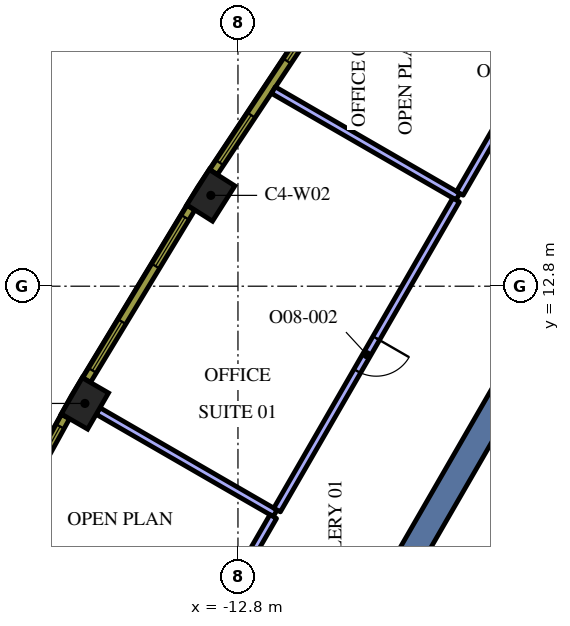
"""IFC4 building model, lengths in metres.
Left out: names, types, materials, properties, quantities, classifications, styles, units other than length and angle.
Written with IfcOpenShell. Run it as: python <this file> out.ifc"""

import sys

from ifc_helpers import new_model, si_unit, direction, frame, frame_2d, origin, origin_2d, place, context, subcontext, project, spatial, rectangle, extrude, element, fill, save


model = new_model("IFC4")
c1 = context("Model", 3, precision=1e-05, world=origin(), true_north=direction((0.0, 1.0)))
c2 = subcontext(c1, "Body", "Model", "MODEL_VIEW")
j1 = project(units=[si_unit("LENGTHUNIT", "METRE"), si_unit("PLANEANGLEUNIT", "RADIAN")], contexts=[c1])
p1 = place(None, origin())
s1 = spatial("IfcSite", under=j1, at=p1, CompositionType="ELEMENT")
p2 = place(p1, origin())
s2 = spatial("IfcBuilding", under=s1, at=p2, CompositionType="ELEMENT")
p3 = place(p2, frame((0.0, 0.0, 235.2)))
s3 = spatial("IfcBuildingStorey", under=s2, at=p3, CompositionType="ELEMENT", Elevation=235.2)
for number, where, z_axis, x_axis in (
    (1, (-13.513, 15.19, 0.0), (0.0, 0.0, 1.0), (-0.536, -0.845, 0.0)),
    (2, (-16.827, 9.715, 0.0), (0.0, 0.0, 1.0), (-0.5, -0.866, 0.0)),
):
    element("IfcColumn", number, at=place(p3, frame(where, z_axis=z_axis, x_axis=x_axis)), inside=s3, PredefinedType="COLUMN", context=c2, shape_type="SweptSolid", body=[
        extrude(rectangle(XDim=1.1, YDim=0.8, at=origin_2d()), origin(), (0.0, 0.0, 1.0), 4.2),
    ])
p4 = place(p3, frame((-12.625, -1.867, 0.0), z_axis=(0.0, 0.0, 1.0), x_axis=(0.500008520515, 0.866020484407, 0.0)))
e3 = element("IfcWall", 3, at=p4, inside=s3, PredefinedType="SOLIDWALL", context=c2, shape_type="SweptSolid", body=[
    extrude(rectangle(XDim=15.859, YDim=0.7, at=frame_2d((7.929, 0.0))), origin(), (0.0, 0.0, 1.0), 4.2),
])
p5 = place(p3, frame((-8.06, -1.311, 0.0), z_axis=(0.0, 0.0, 1.0), x_axis=(0.50000273126, 0.866023826885, 0.0)))
e4 = element("IfcWall", 4, at=p5, inside=s3, PredefinedType="SOLIDWALL", context=c2, shape_type="SweptSolid", body=[
    extrude(rectangle(XDim=10.33, YDim=0.25, at=frame_2d((5.165, 0.0))), origin(), (0.0, 0.0, 1.0), 4.2),
])
p6 = place(p3, frame((-7.011, 15.156, 0.0), z_axis=(0.0, 0.0, 1.0), x_axis=(-0.866015917575, 0.500016430238, 0.0)))
e5 = element("IfcWall", 5, at=p6, inside=s3, PredefinedType="PARTITIONING", context=c2, shape_type="SweptSolid", body=[
    extrude(rectangle(XDim=5.607, YDim=0.2, at=frame_2d((2.804, 0.0))), origin(), (0.0, 0.0, 1.0), 3.45),
])
p7 = place(p3, frame((-6.161, 25.16, 0.0), z_axis=(0.0, 0.0, 1.0), x_axis=(0.414315639321, -0.910133260031, 0.0)))
e6 = element("IfcWall", 6, at=p7, inside=s3, PredefinedType="PARTITIONING", context=c2, shape_type="SweptSolid", body=[
    extrude(rectangle(XDim=7.318, YDim=0.2, at=frame_2d((3.659, 0.0))), origin(), (0.0, 0.0, 1.0), 3.45),
])
p8 = place(p3, frame((-5.836, 17.191, 0.0), z_axis=(0.0, 0.0, 1.0), x_axis=(-0.500048020061, -0.865997677614, 0.0)))
e7 = element("IfcWall", 7, at=p8, inside=s3, PredefinedType="PARTITIONING", context=c2, shape_type="SweptSolid", body=[
    extrude(rectangle(XDim=2.25, YDim=0.2, at=frame_2d((1.125, 0.0))), origin(), (0.0, 0.0, 1.0), 3.45),
])
p9 = place(p3, frame((-11.821, 6.825, 0.0), z_axis=(0.0, 0.0, 1.0), x_axis=(-0.866011792348, 0.500023574959, 0.0)))
e8 = element("IfcWall", 8, at=p9, inside=s3, PredefinedType="PARTITIONING", context=c2, shape_type="SweptSolid", body=[
    extrude(rectangle(XDim=5.381, YDim=0.2, at=frame_2d((2.69, 0.0))), origin(), (0.0, 0.0, 1.0), 3.45),
])
p10 = place(p3, frame((-7.061, 15.069, 0.0), z_axis=(0.0, 0.0, 1.0), x_axis=(-0.500008127286, -0.866020711443, 0.0)))
e9 = element("IfcWall", 9, at=p10, inside=s3, PredefinedType="PARTITIONING", context=c2, shape_type="SweptSolid", body=[
    extrude(rectangle(XDim=9.42, YDim=0.2, at=frame_2d((4.71, 0.0))), origin(), (0.0, 0.0, 1.0), 3.45),
])
p11 = place(p10, frame((4.2, 0.0, 0.0)))
e10 = element("IfcOpeningElement", 10, at=p11, cuts=e9, PredefinedType="OPENING", context=c2, shape_type="SweptSolid", body=[
    extrude(rectangle(XDim=1.0, YDim=2.1, at=frame_2d((0.5, 1.05))), frame((0.0, 0.11, 0.0), z_axis=(0.0, -1.0, 0.0), x_axis=(1.0, 0.0, 0.0)), (0.0, 0.0, 1.0), 0.22),
])
p12 = place(p3, frame((-11.871, 6.738, 0.0), z_axis=(0.0, 0.0, 1.0), x_axis=(-0.500019350398, -0.866014231539, 0.0)))
e11 = element("IfcWall", 11, at=p12, inside=s3, PredefinedType="PARTITIONING", context=c2, shape_type="SweptSolid", body=[
    extrude(rectangle(XDim=9.42, YDim=0.2, at=frame_2d((4.71, 0.0))), origin(), (0.0, 0.0, 1.0), 3.45),
])
p13 = place(p12, frame((4.2, 0.0, 0.0)))
e12 = element("IfcOpeningElement", 12, at=p13, cuts=e11, PredefinedType="OPENING", context=c2, shape_type="SweptSolid", body=[
    extrude(rectangle(XDim=1.0, YDim=2.1, at=frame_2d((0.5, 1.05))), frame((0.0, 0.11, 0.0), z_axis=(0.0, -1.0, 0.0), x_axis=(1.0, 0.0, 0.0)), (0.0, 0.0, 1.0), 0.22),
])
p14 = place(p3, frame((-10.513, 20.218, 0.0), z_axis=(0.0, 0.0, 1.0), x_axis=(-0.552901821755, -0.833246407433, 0.0)))
e13 = element("IfcWall", 13, at=p14, inside=s3, PredefinedType="SOLIDWALL", context=c2, shape_type="SweptSolid", body=[
    extrude(rectangle(XDim=5.298, YDim=0.24, at=frame_2d((2.649, 0.0))), origin(), (0.0, 0.0, 1.0), 3.95),
])
p15 = place(p14, frame((0.294, 0.0, 0.9)))
e14 = element("IfcOpeningElement", 14, at=p15, cuts=e13, PredefinedType="OPENING", context=c2, shape_type="SweptSolid", body=[
    extrude(rectangle(XDim=1.5, YDim=2.55, at=frame_2d((0.75, 1.275))), frame((0.0, 0.13, 0.0), z_axis=(0.0, -1.0, 0.0), x_axis=(1.0, 0.0, 0.0)), (0.0, 0.0, 1.0), 0.26),
])
p16 = place(p14, frame((3.504, 0.0, 0.9)))
e15 = element("IfcOpeningElement", 15, at=p16, cuts=e13, PredefinedType="OPENING", context=c2, shape_type="SweptSolid", body=[
    extrude(rectangle(XDim=1.5, YDim=2.55, at=frame_2d((0.75, 1.275))), frame((0.0, 0.13, 0.0), z_axis=(0.0, -1.0, 0.0), x_axis=(1.0, 0.0, 0.0)), (0.0, 0.0, 1.0), 0.26),
])
p17 = place(p3, frame((-14.038, 14.864, 0.0), z_axis=(0.0, 0.0, 1.0), x_axis=(-0.517846166225, -0.855473756538, 0.0)))
e16 = element("IfcWall", 16, at=p17, inside=s3, PredefinedType="SOLIDWALL", context=c2, shape_type="SweptSolid", body=[
    extrude(rectangle(XDim=5.298, YDim=0.24, at=frame_2d((2.649, 0.0))), origin(), (0.0, 0.0, 1.0), 3.95),
])
p18 = place(p17, frame((0.294, 0.0, 0.9)))
e17 = element("IfcOpeningElement", 17, at=p18, cuts=e16, PredefinedType="OPENING", context=c2, shape_type="SweptSolid", body=[
    extrude(rectangle(XDim=1.5, YDim=2.55, at=frame_2d((0.75, 1.275))), frame((0.0, 0.13, 0.0), z_axis=(0.0, -1.0, 0.0), x_axis=(1.0, 0.0, 0.0)), (0.0, 0.0, 1.0), 0.26),
])
p19 = place(p17, frame((3.504, 0.0, 0.9)))
e18 = element("IfcOpeningElement", 18, at=p19, cuts=e16, PredefinedType="OPENING", context=c2, shape_type="SweptSolid", body=[
    extrude(rectangle(XDim=1.5, YDim=2.55, at=frame_2d((0.75, 1.275))), frame((0.0, 0.13, 0.0), z_axis=(0.0, -1.0, 0.0), x_axis=(1.0, 0.0, 0.0)), (0.0, 0.0, 1.0), 0.26),
])
p20 = place(p3, frame((-17.338, 9.368, 0.0), z_axis=(0.0, 0.0, 1.0), x_axis=(-0.481925825015, -0.876212017256, 0.0)))
e19 = element("IfcWall", 19, at=p20, inside=s3, PredefinedType="SOLIDWALL", context=c2, shape_type="SweptSolid", body=[
    extrude(rectangle(XDim=5.299, YDim=0.24, at=frame_2d((2.649, 0.0))), origin(), (0.0, 0.0, 1.0), 3.95),
])
p21 = place(p20, frame((0.295, 0.0, 0.9)))
e20 = element("IfcOpeningElement", 20, at=p21, cuts=e19, PredefinedType="OPENING", context=c2, shape_type="SweptSolid", body=[
    extrude(rectangle(XDim=1.5, YDim=2.55, at=frame_2d((0.75, 1.275))), frame((0.0, 0.13, 0.0), z_axis=(0.0, -1.0, 0.0), x_axis=(1.0, 0.0, 0.0)), (0.0, 0.0, 1.0), 0.26),
])
p22 = place(p20, frame((3.504, 0.0, 0.9)))
e21 = element("IfcOpeningElement", 21, at=p22, cuts=e19, PredefinedType="OPENING", context=c2, shape_type="SweptSolid", body=[
    extrude(rectangle(XDim=1.5, YDim=2.55, at=frame_2d((0.75, 1.275))), frame((0.0, 0.13, 0.0), z_axis=(0.0, -1.0, 0.0), x_axis=(1.0, 0.0, 0.0)), (0.0, 0.0, 1.0), 0.26),
])
p23 = place(p11, origin())
e22 = element("IfcDoor", 22, at=p23, inside=s3, OperationType="SINGLE_SWING_LEFT", PredefinedType="DOOR", context=c2, shape_type="SweptSolid", body=[
    extrude(rectangle(XDim=1.0, YDim=2.1, at=frame_2d((0.5, 1.05))), frame((0.0, 0.025, 0.0), z_axis=(0.0, -1.0, 0.0), x_axis=(1.0, 0.0, 0.0)), (0.0, 0.0, 1.0), 0.05),
])
fill(e10, e22)
p24 = place(p15, origin())
e23 = element("IfcWindow", 23, at=p24, inside=s3, PartitioningType="SINGLE_PANEL", PredefinedType="WINDOW", context=c2, shape_type="SweptSolid", body=[
    extrude(rectangle(XDim=1.5, YDim=2.55, at=frame_2d((0.75, 1.275))), frame((0.0, 0.04, 0.0), z_axis=(0.0, -1.0, 0.0), x_axis=(1.0, 0.0, 0.0)), (0.0, 0.0, 1.0), 0.06),
])
fill(e14, e23)
p25 = place(p16, origin())
e24 = element("IfcWindow", 24, at=p25, inside=s3, PartitioningType="SINGLE_PANEL", PredefinedType="WINDOW", context=c2, shape_type="SweptSolid", body=[
    extrude(rectangle(XDim=1.5, YDim=2.55, at=frame_2d((0.75, 1.275))), frame((0.0, 0.04, 0.0), z_axis=(0.0, -1.0, 0.0), x_axis=(1.0, 0.0, 0.0)), (0.0, 0.0, 1.0), 0.06),
])
fill(e15, e24)
p26 = place(p18, origin())
e25 = element("IfcWindow", 25, at=p26, inside=s3, PartitioningType="SINGLE_PANEL", PredefinedType="WINDOW", context=c2, shape_type="SweptSolid", body=[
    extrude(rectangle(XDim=1.5, YDim=2.55, at=frame_2d((0.75, 1.275))), frame((0.0, 0.04, 0.0), z_axis=(0.0, -1.0, 0.0), x_axis=(1.0, 0.0, 0.0)), (0.0, 0.0, 1.0), 0.06),
])
fill(e17, e25)
p27 = place(p19, origin())
e26 = element("IfcWindow", 26, at=p27, inside=s3, PartitioningType="SINGLE_PANEL", PredefinedType="WINDOW", context=c2, shape_type="SweptSolid", body=[
    extrude(rectangle(XDim=1.5, YDim=2.55, at=frame_2d((0.75, 1.275))), frame((0.0, 0.04, 0.0), z_axis=(0.0, -1.0, 0.0), x_axis=(1.0, 0.0, 0.0)), (0.0, 0.0, 1.0), 0.06),
])
fill(e18, e26)
p28 = place(p21, origin())
e27 = element("IfcWindow", 27, at=p28, inside=s3, PartitioningType="SINGLE_PANEL", PredefinedType="WINDOW", context=c2, shape_type="SweptSolid", body=[
    extrude(rectangle(XDim=1.5, YDim=2.55, at=frame_2d((0.75, 1.275))), frame((0.0, 0.04, 0.0), z_axis=(0.0, -1.0, 0.0), x_axis=(1.0, 0.0, 0.0)), (0.0, 0.0, 1.0), 0.06),
])
fill(e20, e27)
save(model, sys.argv[1])
